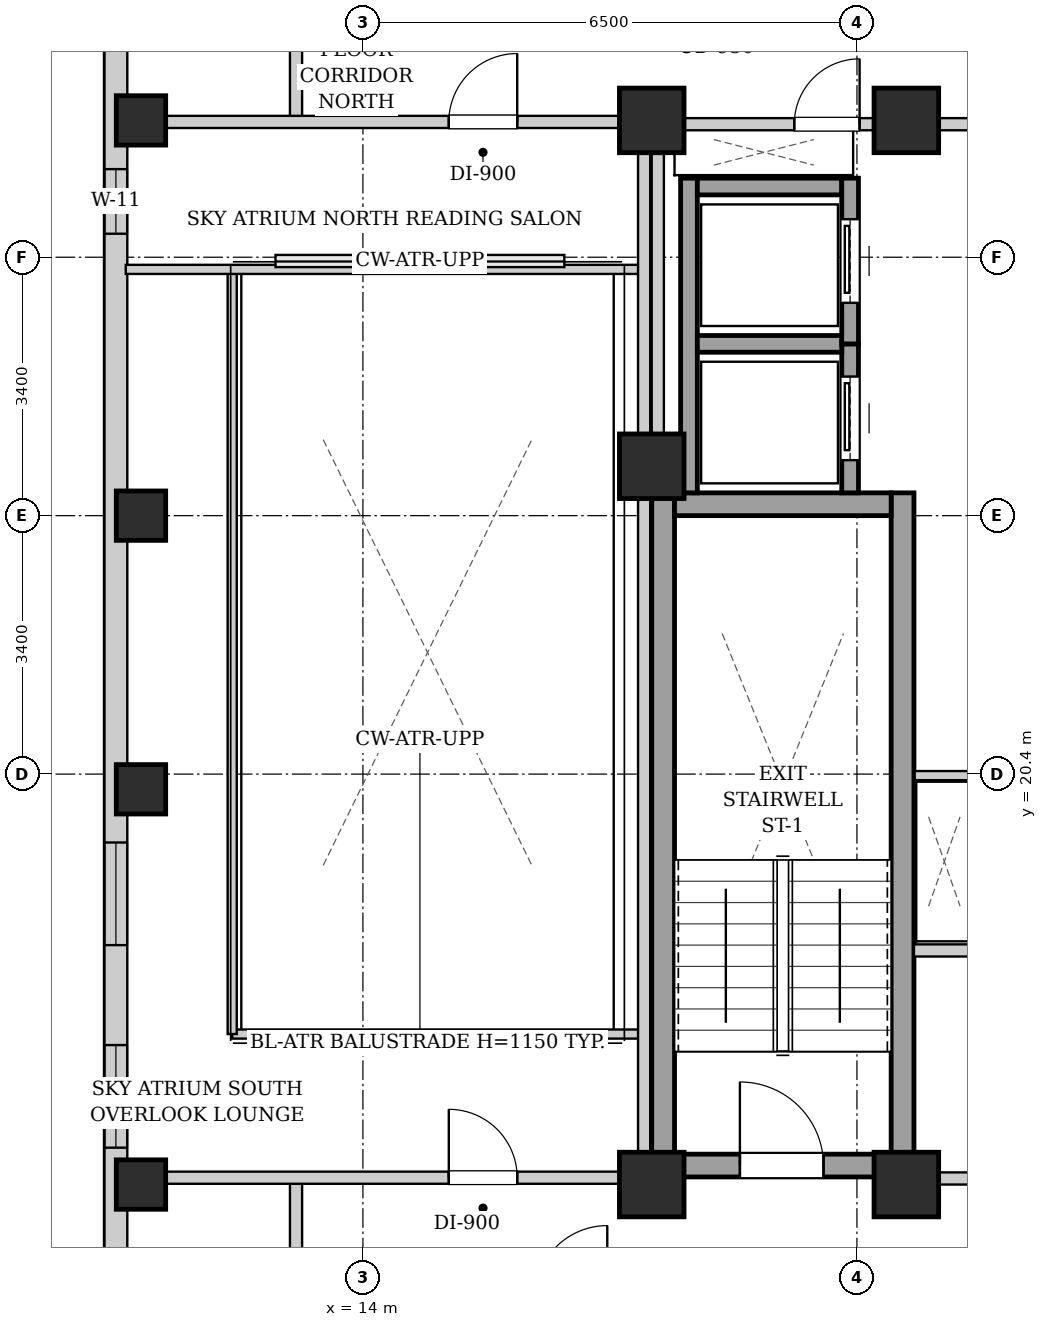
"""IFC4 building model, lengths in metres.
Left out: names, types, materials, properties, quantities, classifications, styles, units other than length and angle.
Written with IfcOpenShell. Run it as: python <this file> out.ifc"""

import sys

from ifc_helpers import new_model, si_unit, direction, frame, frame_2d, origin, origin_2d, place, context, subcontext, project, spatial, rectangle, extrude, element, fill, save


model = new_model("IFC4")
c1 = context("Model", 3, precision=1e-05, world=origin(), true_north=direction((0.0, 1.0)))
c2 = subcontext(c1, "Body", "Model", "MODEL_VIEW")
j1 = project(units=[si_unit("LENGTHUNIT", "METRE"), si_unit("PLANEANGLEUNIT", "RADIAN")], contexts=[c1])
p1 = place(None, origin())
s1 = spatial("IfcSite", under=j1, at=p1, CompositionType="ELEMENT")
p2 = place(p1, origin())
s2 = spatial("IfcBuilding", under=s1, at=p2, CompositionType="ELEMENT")
p3 = place(p2, frame((0.0, 0.0, 181.0)))
s3 = spatial("IfcBuildingStorey", under=s2, at=p3, CompositionType="ELEMENT", Elevation=181.0)
for number, where, z_axis, x_axis in (
    (1, (11.08, 15.0, 0.0), (0.0, 0.0, 1.0), (1.0, 0.0, 0.0)),
    (2, (11.08, 20.2, 0.0), (0.0, 0.0, 1.0), (1.0, 0.0, 0.0)),
    (3, (11.08, 23.8, 0.0), (0.0, 0.0, 1.0), (1.0, 0.0, 0.0)),
    (4, (11.08, 29.0, 0.0), (0.0, 0.0, 1.0), (1.0, 0.0, 0.0)),
):
    element("IfcColumn", number, at=place(p3, frame(where, z_axis=z_axis, x_axis=x_axis)), inside=s3, PredefinedType="COLUMN", context=c2, shape_type="SweptSolid", body=[
        extrude(rectangle(XDim=0.65, YDim=0.65, at=origin_2d()), origin(), (0.0, 0.0, 1.0), 3.3),
    ])
for number, where, z_axis, x_axis in (
    (5, (17.8, 15.0, 0.0), (0.0, 0.0, 1.0), (1.0, 0.0, 0.0)),
    (6, (21.15, 15.0, 0.0), (0.0, 0.0, 1.0), (1.0, 0.0, 0.0)),
    (7, (17.8, 29.0, 0.0), (0.0, 0.0, 1.0), (1.0, 0.0, 0.0)),
    (8, (21.15, 29.0, 0.0), (0.0, 0.0, 1.0), (1.0, 0.0, 0.0)),
    (9, (17.8, 24.45, 0.0), (0.0, 0.0, 1.0), (1.0, 0.0, 0.0)),
):
    element("IfcColumn", number, at=place(p3, frame(where, z_axis=z_axis, x_axis=x_axis)), inside=s3, PredefinedType="COLUMN", context=c2, shape_type="SweptSolid", body=[
        extrude(rectangle(XDim=0.85, YDim=0.85, at=origin_2d()), origin(), (0.0, 0.0, 1.0), 3.3),
    ])
p4 = place(p3, frame((10.75, 6.3, 0.0), z_axis=(0.0, 0.0, 1.0), x_axis=(0.0, 1.0, 0.0)))
e10 = element("IfcWall", 10, at=p4, inside=s3, PredefinedType="SOLIDWALL", context=c2, shape_type="SweptSolid", body=[
    extrude(rectangle(XDim=31.4, YDim=0.3, at=frame_2d((15.7, 0.0))), origin(), (0.0, 0.0, 1.0), 3.04),
])
p5 = place(p4, frame((1.653, 0.0, 0.55)))
e11 = element("IfcOpeningElement", 11, at=p5, cuts=e10, PredefinedType="OPENING", context=c2, shape_type="SweptSolid", body=[
    extrude(rectangle(XDim=1.35, YDim=1.2, at=frame_2d((0.675, 0.6))), frame((0.0, 0.16, 0.0), z_axis=(0.0, -1.0, 0.0), x_axis=(1.0, 0.0, 0.0)), (0.0, 0.0, 1.0), 0.32),
])
p6 = place(p4, frame((11.85, 0.0, 0.55)))
e12 = element("IfcOpeningElement", 12, at=p6, cuts=e10, PredefinedType="OPENING", context=c2, shape_type="SweptSolid", body=[
    extrude(rectangle(XDim=1.35, YDim=1.2, at=frame_2d((0.675, 0.6))), frame((0.0, 0.16, 0.0), z_axis=(0.0, -1.0, 0.0), x_axis=(1.0, 0.0, 0.0)), (0.0, 0.0, 1.0), 0.32),
])
p7 = place(p4, frame((9.185, 0.0, 0.55)))
e13 = element("IfcOpeningElement", 13, at=p7, cuts=e10, PredefinedType="OPENING", context=c2, shape_type="SweptSolid", body=[
    extrude(rectangle(XDim=1.35, YDim=1.2, at=frame_2d((0.675, 0.6))), frame((0.0, 0.16, 0.0), z_axis=(0.0, -1.0, 0.0), x_axis=(1.0, 0.0, 0.0)), (0.0, 0.0, 1.0), 0.32),
])
p8 = place(p4, frame((21.209, 0.0, 0.55)))
e14 = element("IfcOpeningElement", 14, at=p8, cuts=e10, PredefinedType="OPENING", context=c2, shape_type="SweptSolid", body=[
    extrude(rectangle(XDim=0.85, YDim=1.2, at=frame_2d((0.425, 0.6))), frame((0.0, 0.16, 0.0), z_axis=(0.0, -1.0, 0.0), x_axis=(1.0, 0.0, 0.0)), (0.0, 0.0, 1.0), 0.32),
])
for number, where, z_axis, x_axis in (
    (15, (17.95, 15.1, 0.0), (0.0, 0.0, 1.0), (0.0, 1.0, 0.0)),
    (16, (21.1, 15.1, 0.0), (0.0, 0.0, 1.0), (0.0, 1.0, 0.0)),
):
    element("IfcWall", number, at=place(p3, frame(where, z_axis=z_axis, x_axis=x_axis)), inside=s3, PredefinedType="SHEAR", context=c2, shape_type="SweptSolid", body=[
        extrude(rectangle(XDim=9.0, YDim=0.3, at=frame_2d((4.5, 0.0))), origin(), (0.0, 0.0, 1.0), 3.04),
    ])
p9 = place(p3, frame((18.1, 23.95, 0.0), z_axis=(0.0, 0.0, 1.0), x_axis=(1.0, 0.0, 0.0)))
e17 = element("IfcWall", 17, at=p9, inside=s3, PredefinedType="SHEAR", context=c2, shape_type="SweptSolid", body=[
    extrude(rectangle(XDim=2.85, YDim=0.3, at=frame_2d((1.425, 0.0))), origin(), (0.0, 0.0, 1.0), 3.04),
])
p10 = place(p3, frame((18.1, 15.25, 0.0), z_axis=(0.0, 0.0, 1.0), x_axis=(1.0, 0.0, 0.0)))
e18 = element("IfcWall", 18, at=p10, inside=s3, PredefinedType="SHEAR", context=c2, shape_type="SweptSolid", body=[
    extrude(rectangle(XDim=2.85, YDim=0.3, at=frame_2d((1.425, 0.0))), origin(), (0.0, 0.0, 1.0), 3.04),
])
p11 = place(p10, frame((0.86, 0.0, 0.0)))
e19 = element("IfcOpeningElement", 19, at=p11, cuts=e18, PredefinedType="OPENING", context=c2, shape_type="SweptSolid", body=[
    extrude(rectangle(XDim=1.1, YDim=2.05, at=frame_2d((0.55, 1.025))), frame((0.0, 0.16, 0.0), z_axis=(0.0, -1.0, 0.0), x_axis=(1.0, 0.0, 0.0)), (0.0, 0.0, 1.0), 0.32),
])
p12 = place(p3, frame((18.29, 24.1, 0.0), z_axis=(0.0, 0.0, 1.0), x_axis=(0.0, 1.0, 0.0)))
e20 = element("IfcWall", 20, at=p12, inside=s3, PredefinedType="SHEAR", context=c2, shape_type="SweptSolid", body=[
    extrude(rectangle(XDim=4.14, YDim=0.22, at=frame_2d((2.07, 0.0))), origin(), (0.0, 0.0, 1.0), 3.04),
])
p13 = place(p3, frame((20.41, 24.1, 0.0), z_axis=(0.0, 0.0, 1.0), x_axis=(0.0, 1.0, 0.0)))
e21 = element("IfcWall", 21, at=p13, inside=s3, PredefinedType="SHEAR", context=c2, shape_type="SweptSolid", body=[
    extrude(rectangle(XDim=1.96, YDim=0.22, at=frame_2d((0.98, 0.0))), origin(), (0.0, 0.0, 1.0), 3.04),
])
p14 = place(p13, frame((0.43, 0.0, 0.0)))
e22 = element("IfcOpeningElement", 22, at=p14, cuts=e21, PredefinedType="OPENING", context=c2, shape_type="SweptSolid", body=[
    extrude(rectangle(XDim=1.1, YDim=2.15, at=frame_2d((0.55, 1.075))), frame((0.0, 0.12, 0.0), z_axis=(0.0, -1.0, 0.0), x_axis=(1.0, 0.0, 0.0)), (0.0, 0.0, 1.0), 0.24),
])
for number, where, z_axis, x_axis in (
    (23, (18.4, 26.06, 0.0), (0.0, 0.0, 1.0), (1.0, 0.0, 0.0)),
    (24, (18.4, 28.13, 0.0), (0.0, 0.0, 1.0), (1.0, 0.0, 0.0)),
):
    element("IfcWall", number, at=place(p3, frame(where, z_axis=z_axis, x_axis=x_axis)), inside=s3, PredefinedType="SHEAR", context=c2, shape_type="SweptSolid", body=[
        extrude(rectangle(XDim=1.9, YDim=0.22, at=frame_2d((0.95, 0.0))), origin(), (0.0, 0.0, 1.0), 3.04),
    ])
p15 = place(p3, frame((20.41, 26.06, 0.0), z_axis=(0.0, 0.0, 1.0), x_axis=(0.0, 1.0, 0.0)))
e25 = element("IfcWall", 25, at=p15, inside=s3, PredefinedType="SHEAR", context=c2, shape_type="SweptSolid", body=[
    extrude(rectangle(XDim=2.18, YDim=0.22, at=frame_2d((1.09, 0.0))), origin(), (0.0, 0.0, 1.0), 3.04),
])
p16 = place(p15, frame((0.54, 0.0, 0.0)))
e26 = element("IfcOpeningElement", 26, at=p16, cuts=e25, PredefinedType="OPENING", context=c2, shape_type="SweptSolid", body=[
    extrude(rectangle(XDim=1.1, YDim=2.15, at=frame_2d((0.55, 1.075))), frame((0.0, 0.12, 0.0), z_axis=(0.0, -1.0, 0.0), x_axis=(1.0, 0.0, 0.0)), (0.0, 0.0, 1.0), 0.24),
])
p17 = place(p3, frame((21.25, 15.08, 0.0), z_axis=(0.0, 0.0, 1.0), x_axis=(1.0, 0.0, 0.0)))
e27 = element("IfcWall", 27, at=p17, inside=s3, PredefinedType="PARTITIONING", context=c2, shape_type="SweptSolid", body=[
    extrude(rectangle(XDim=8.5, YDim=0.16, at=frame_2d((4.25, 0.0))), origin(), (0.0, 0.0, 1.0), 2.556),
])
p18 = place(p17, frame((3.725, 0.0, 0.0)))
e28 = element("IfcOpeningElement", 28, at=p18, cuts=e27, PredefinedType="OPENING", context=c2, shape_type="SweptSolid", body=[
    extrude(rectangle(XDim=1.05, YDim=2.05, at=frame_2d((0.525, 1.025))), frame((0.0, 0.09, 0.0), z_axis=(0.0, -1.0, 0.0), x_axis=(1.0, 0.0, 0.0)), (0.0, 0.0, 1.0), 0.18),
])
p19 = place(p3, frame((21.25, 18.08, 0.0), z_axis=(0.0, 0.0, 1.0), x_axis=(1.0, 0.0, 0.0)))
e29 = element("IfcWall", 29, at=p19, inside=s3, PredefinedType="PARTITIONING", context=c2, shape_type="SweptSolid", body=[
    extrude(rectangle(XDim=1.1, YDim=0.16, at=frame_2d((0.55, 0.0))), origin(), (0.0, 0.0, 1.0), 3.04),
])
p20 = place(p3, frame((17.88, 24.12, 0.0), z_axis=(0.0, 0.0, 1.0), x_axis=(0.0, 1.0, 0.0)))
e30 = element("IfcWall", 30, at=p20, inside=s3, PredefinedType="PARTITIONING", context=c2, shape_type="SweptSolid", body=[
    extrude(rectangle(XDim=4.76, YDim=0.16, at=frame_2d((2.38, 0.0))), origin(), (0.0, 0.0, 1.0), 3.04),
])
p21 = place(p3, frame((17.96, 28.95, 0.0), z_axis=(0.0, 0.0, 1.0), x_axis=(1.0, 0.0, 0.0)))
e31 = element("IfcWall", 31, at=p21, inside=s3, PredefinedType="PARTITIONING", context=c2, shape_type="SweptSolid", body=[
    extrude(rectangle(XDim=4.29, YDim=0.16, at=frame_2d((2.145, 0.0))), origin(), (0.0, 0.0, 1.0), 2.556),
])
p22 = place(p21, frame((1.715, 0.0, 0.0)))
e32 = element("IfcOpeningElement", 32, at=p22, cuts=e31, PredefinedType="OPENING", context=c2, shape_type="SweptSolid", body=[
    extrude(rectangle(XDim=0.86, YDim=2.05, at=frame_2d((0.43, 1.025))), frame((0.0, 0.09, 0.0), z_axis=(0.0, -1.0, 0.0), x_axis=(1.0, 0.0, 0.0)), (0.0, 0.0, 1.0), 0.18),
])
p23 = place(p3, frame((22.28, 20.38, 0.0), z_axis=(0.0, 0.0, 1.0), x_axis=(-1.0, 0.0, 0.0)))
e33 = element("IfcWall", 33, at=p23, inside=s3, PredefinedType="PARTITIONING", context=c2, shape_type="SweptSolid", body=[
    extrude(rectangle(XDim=1.02, YDim=0.12, at=frame_2d((0.51, 0.0))), origin(), (0.0, 0.0, 1.0), 3.04),
])
for number, where, z_axis, x_axis in (
    (34, (13.12, 13.51, 0.0), (0.0, 0.0, 1.0), (0.0, 1.0, 0.0)),
    (35, (13.12, 28.98, 0.0), (0.0, 0.0, 1.0), (0.0, 1.0, 0.0)),
):
    element("IfcWall", number, at=place(p3, frame(where, z_axis=z_axis, x_axis=x_axis)), inside=s3, PredefinedType="PARTITIONING", context=c2, shape_type="SweptSolid", body=[
        extrude(rectangle(XDim=1.58, YDim=0.16, at=frame_2d((0.79, 0.0))), origin(), (0.0, 0.0, 1.0), 3.04),
    ])
p24 = place(p3, frame((10.88, 15.09, 0.0), z_axis=(0.0, 0.0, 1.0), x_axis=(1.0, 0.0, 0.0)))
e36 = element("IfcWall", 36, at=p24, inside=s3, PredefinedType="PARTITIONING", context=c2, shape_type="SweptSolid", body=[
    extrude(rectangle(XDim=6.88, YDim=0.16, at=frame_2d((3.44, 0.0))), origin(), (0.0, 0.0, 1.0), 2.556),
])
p25 = place(p24, frame((4.25, 0.0, 0.0)))
e37 = element("IfcOpeningElement", 37, at=p25, cuts=e36, PredefinedType="OPENING", context=c2, shape_type="SweptSolid", body=[
    extrude(rectangle(XDim=0.9, YDim=2.05, at=frame_2d((0.45, 1.025))), frame((0.0, 0.09, 0.0), z_axis=(0.0, -1.0, 0.0), x_axis=(1.0, 0.0, 0.0)), (0.0, 0.0, 1.0), 0.18),
])
p26 = place(p3, frame((12.28, 16.98, 0.0), z_axis=(0.0, 0.0, 1.0), x_axis=(1.0, 0.0, 0.0)))
e38 = element("IfcWall", 38, at=p26, inside=s3, PredefinedType="PARTITIONING", context=c2, shape_type="SweptSolid", body=[
    extrude(rectangle(XDim=5.48, YDim=0.12, at=frame_2d((2.74, 0.0))), origin(), (0.0, 0.0, 1.0), 3.04),
])
p27 = place(p3, frame((12.28, 16.98, 0.0), z_axis=(0.0, 0.0, 1.0), x_axis=(0.0, 1.0, 0.0)))
e39 = element("IfcWall", 39, at=p27, inside=s3, PredefinedType="PARTITIONING", context=c2, shape_type="SweptSolid", body=[
    extrude(rectangle(XDim=10.04, YDim=0.12, at=frame_2d((5.02, 0.0))), origin(), (0.0, 0.0, 1.0), 3.04),
])
p28 = place(p3, frame((10.88, 28.98, 0.0), z_axis=(0.0, 0.0, 1.0), x_axis=(1.0, 0.0, 0.0)))
e40 = element("IfcWall", 40, at=p28, inside=s3, PredefinedType="PARTITIONING", context=c2, shape_type="SweptSolid", body=[
    extrude(rectangle(XDim=6.88, YDim=0.16, at=frame_2d((3.44, 0.0))), origin(), (0.0, 0.0, 1.0), 2.556),
])
p29 = place(p28, frame((4.25, 0.0, 0.0)))
e41 = element("IfcOpeningElement", 41, at=p29, cuts=e40, PredefinedType="OPENING", context=c2, shape_type="SweptSolid", body=[
    extrude(rectangle(XDim=0.9, YDim=2.05, at=frame_2d((0.45, 1.025))), frame((0.0, 0.09, 0.0), z_axis=(0.0, -1.0, 0.0), x_axis=(1.0, 0.0, 0.0)), (0.0, 0.0, 1.0), 0.18),
])
p30 = place(p3, frame((10.88, 27.04, 0.0), z_axis=(0.0, 0.0, 1.0), x_axis=(1.0, 0.0, 0.0)))
e42 = element("IfcWall", 42, at=p30, inside=s3, PredefinedType="PARTITIONING", context=c2, shape_type="SweptSolid", body=[
    extrude(rectangle(XDim=6.88, YDim=0.12, at=frame_2d((3.44, 0.0))), origin(), (0.0, 0.0, 1.0), 3.04),
])
p31 = place(p3, frame((17.7, 15.02, 0.0), z_axis=(0.0, 0.0, 1.0), x_axis=(0.0, 1.0, 0.0)))
e43 = element("IfcWall", 43, at=p31, inside=s3, PredefinedType="PARTITIONING", context=c2, shape_type="SweptSolid", body=[
    extrude(rectangle(XDim=13.98, YDim=0.16, at=frame_2d((6.99, 0.0))), origin(), (0.0, 0.0, 1.0), 3.04),
])
p32 = place(p11, origin())
e44 = element("IfcDoor", 44, at=p32, inside=s3, OperationType="SINGLE_SWING_LEFT", PredefinedType="DOOR", context=c2, shape_type="SweptSolid", body=[
    extrude(rectangle(XDim=1.1, YDim=2.05, at=frame_2d((0.55, 1.025))), frame((0.0, 0.025, 0.0), z_axis=(0.0, -1.0, 0.0), x_axis=(1.0, 0.0, 0.0)), (0.0, 0.0, 1.0), 0.05),
])
fill(e19, e44)
p33 = place(p14, origin())
e45 = element("IfcDoor", 45, at=p33, inside=s3, OperationType="SLIDING_TO_LEFT", PredefinedType="DOOR", context=c2, shape_type="SweptSolid", body=[
    extrude(rectangle(XDim=1.1, YDim=2.15, at=frame_2d((0.55, 1.075))), frame((0.0, 0.025, 0.0), z_axis=(0.0, -1.0, 0.0), x_axis=(1.0, 0.0, 0.0)), (0.0, 0.0, 1.0), 0.05),
])
fill(e22, e45)
p34 = place(p16, origin())
e46 = element("IfcDoor", 46, at=p34, inside=s3, OperationType="SLIDING_TO_LEFT", PredefinedType="DOOR", context=c2, shape_type="SweptSolid", body=[
    extrude(rectangle(XDim=1.1, YDim=2.15, at=frame_2d((0.55, 1.075))), frame((0.0, 0.025, 0.0), z_axis=(0.0, -1.0, 0.0), x_axis=(1.0, 0.0, 0.0)), (0.0, 0.0, 1.0), 0.05),
])
fill(e26, e46)
p35 = place(p22, origin())
e47 = element("IfcDoor", 47, at=p35, inside=s3, OperationType="SINGLE_SWING_RIGHT", PredefinedType="DOOR", context=c2, shape_type="SweptSolid", body=[
    extrude(rectangle(XDim=0.86, YDim=2.05, at=frame_2d((0.43, 1.025))), frame((0.0, 0.025, 0.0), z_axis=(0.0, -1.0, 0.0), x_axis=(1.0, 0.0, 0.0)), (0.0, 0.0, 1.0), 0.05),
])
fill(e32, e47)
p36 = place(p25, origin())
e48 = element("IfcDoor", 48, at=p36, inside=s3, OperationType="SINGLE_SWING_LEFT", PredefinedType="DOOR", context=c2, shape_type="SweptSolid", body=[
    extrude(rectangle(XDim=0.9, YDim=2.05, at=frame_2d((0.45, 1.025))), frame((0.0, 0.025, 0.0), z_axis=(0.0, -1.0, 0.0), x_axis=(1.0, 0.0, 0.0)), (0.0, 0.0, 1.0), 0.05),
])
fill(e37, e48)
p37 = place(p29, origin())
e49 = element("IfcDoor", 49, at=p37, inside=s3, OperationType="SINGLE_SWING_RIGHT", PredefinedType="DOOR", context=c2, shape_type="SweptSolid", body=[
    extrude(rectangle(XDim=0.9, YDim=2.05, at=frame_2d((0.45, 1.025))), frame((0.0, 0.025, 0.0), z_axis=(0.0, -1.0, 0.0), x_axis=(1.0, 0.0, 0.0)), (0.0, 0.0, 1.0), 0.05),
])
fill(e41, e49)
p38 = place(p6, origin())
e50 = element("IfcWindow", 50, at=p38, inside=s3, PartitioningType="SINGLE_PANEL", PredefinedType="WINDOW", context=c2, shape_type="SweptSolid", body=[
    extrude(rectangle(XDim=1.35, YDim=1.2, at=frame_2d((0.675, 0.6))), frame((0.0, 0.03, 0.0), z_axis=(0.0, -1.0, 0.0), x_axis=(1.0, 0.0, 0.0)), (0.0, 0.0, 1.0), 0.06),
])
fill(e12, e50)
p39 = place(p7, origin())
e51 = element("IfcWindow", 51, at=p39, inside=s3, PartitioningType="SINGLE_PANEL", PredefinedType="WINDOW", context=c2, shape_type="SweptSolid", body=[
    extrude(rectangle(XDim=1.35, YDim=1.2, at=frame_2d((0.675, 0.6))), frame((0.0, 0.03, 0.0), z_axis=(0.0, -1.0, 0.0), x_axis=(1.0, 0.0, 0.0)), (0.0, 0.0, 1.0), 0.06),
])
fill(e13, e51)
p40 = place(p8, origin())
e52 = element("IfcWindow", 52, at=p40, inside=s3, PartitioningType="SINGLE_PANEL", PredefinedType="WINDOW", context=c2, shape_type="SweptSolid", body=[
    extrude(rectangle(XDim=0.85, YDim=1.2, at=frame_2d((0.425, 0.6))), frame((0.0, 0.03, 0.0), z_axis=(0.0, -1.0, 0.0), x_axis=(1.0, 0.0, 0.0)), (0.0, 0.0, 1.0), 0.06),
])
fill(e14, e52)
save(model, sys.argv[1])
